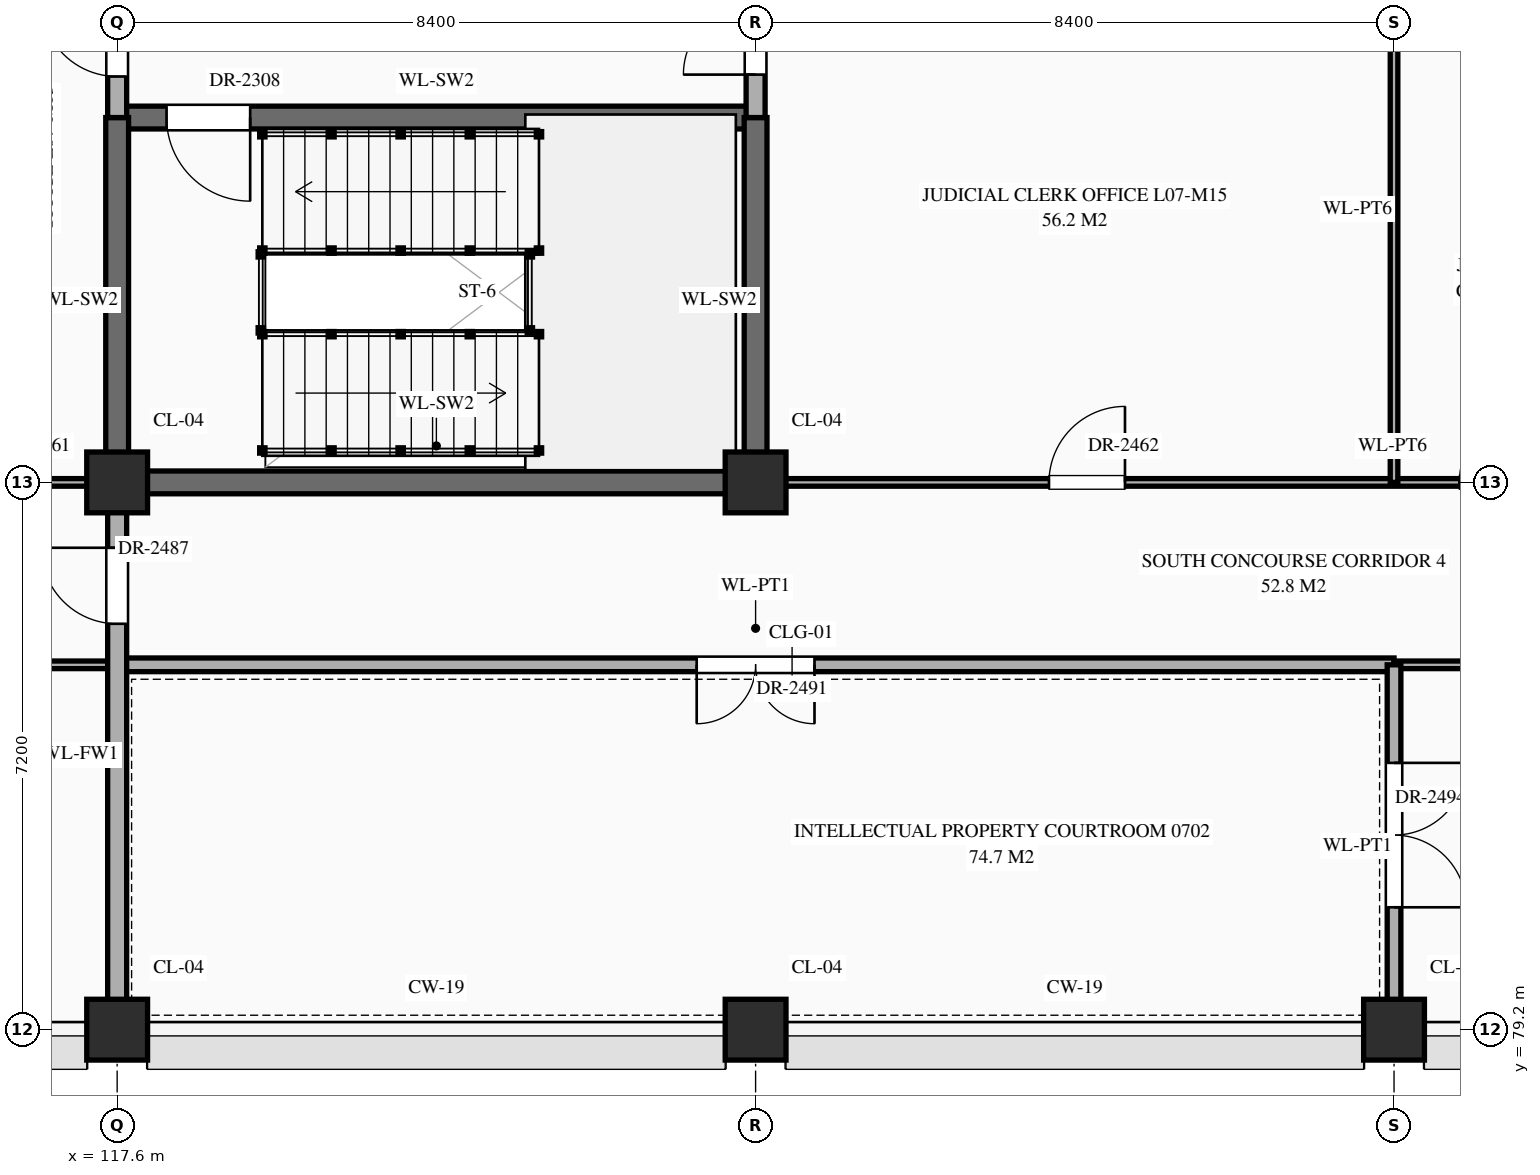
"""IFC4 building model, lengths in metres.
Left out: names, types, materials, properties, quantities, classifications, styles, units other than length and angle.
Written with IfcOpenShell. Run it as: python <this file> out.ifc"""

import sys

from ifc_helpers import new_model, si_unit, direction, frame, frame_2d, origin, origin_2d, place, context, subcontext, project, spatial, rectangle, extrude, element, fill, save


model = new_model("IFC4")
c1 = context("Model", 3, precision=1e-05, world=origin(), true_north=direction((0.0, 1.0)))
c2 = subcontext(c1, "Body", "Model", "MODEL_VIEW")
j1 = project(units=[si_unit("LENGTHUNIT", "METRE"), si_unit("PLANEANGLEUNIT", "RADIAN")], contexts=[c1])
p1 = place(None, origin())
s1 = spatial("IfcSite", under=j1, at=p1, CompositionType="ELEMENT")
p2 = place(p1, origin())
s2 = spatial("IfcBuilding", under=s1, at=p2, CompositionType="ELEMENT")
p3 = place(p2, frame((0.0, 0.0, 30.6)))
s3 = spatial("IfcBuildingStorey", under=s2, at=p3, CompositionType="ELEMENT", Elevation=30.6)
for number, where, z_axis, x_axis in (
    (1, (117.6, 79.2, 0.0), (0.0, 0.0, 1.0), (1.0, 0.0, 0.0)),
    (2, (117.6, 86.4, 0.0), (0.0, 0.0, 1.0), (1.0, 0.0, 0.0)),
    (3, (126.0, 79.2, 0.0), (0.0, 0.0, 1.0), (1.0, 0.0, 0.0)),
    (4, (126.0, 86.4, 0.0), (0.0, 0.0, 1.0), (1.0, 0.0, 0.0)),
    (5, (134.4, 79.2, 0.0), (0.0, 0.0, 1.0), (1.0, 0.0, 0.0)),
):
    element("IfcColumn", number, at=place(p3, frame(where, z_axis=z_axis, x_axis=x_axis)), inside=s3, PredefinedType="COLUMN", context=c2, shape_type="SweptSolid", body=[
        extrude(rectangle(XDim=0.8, YDim=0.8, at=origin_2d()), origin(), (0.0, 0.0, 1.0), 4.5),
    ])
p4 = place(p3, frame((100.8, 84.0, 0.0), z_axis=(0.0, 0.0, 1.0), x_axis=(1.0, 0.0, 0.0)))
e6 = element("IfcWall", 6, at=p4, inside=s3, PredefinedType="STANDARD", context=c2, shape_type="SweptSolid", body=[
    extrude(rectangle(XDim=16.8, YDim=0.1, at=frame_2d((8.4, 0.0))), origin(), (0.0, 0.0, 1.0), 4.24),
])
p5 = place(p4, frame((3.69, 0.0, 0.0)))
e7 = element("IfcOpeningElement", 7, at=p5, cuts=e6, PredefinedType="OPENING", context=c2, shape_type="SweptSolid", body=[
    extrude(rectangle(XDim=1.02, YDim=2.4, at=frame_2d((0.51, 1.2))), frame((0.0, 0.062, 0.0), z_axis=(0.0, -1.0, 0.0), x_axis=(1.0, 0.0, 0.0)), (0.0, 0.0, 1.0), 0.124),
])
p6 = place(p4, frame((12.07, 0.0, 0.0)))
e8 = element("IfcOpeningElement", 8, at=p6, cuts=e6, PredefinedType="OPENING", context=c2, shape_type="SweptSolid", body=[
    extrude(rectangle(XDim=1.06, YDim=2.4, at=frame_2d((0.53, 1.2))), frame((0.0, 0.062, 0.0), z_axis=(0.0, -1.0, 0.0), x_axis=(1.0, 0.0, 0.0)), (0.0, 0.0, 1.0), 0.124),
])
p7 = place(p3, frame((117.6, 84.0, 0.0), z_axis=(0.0, 0.0, 1.0), x_axis=(1.0, 0.0, 0.0)))
e9 = element("IfcWall", 9, at=p7, inside=s3, PredefinedType="STANDARD", context=c2, shape_type="SweptSolid", body=[
    extrude(rectangle(XDim=16.8, YDim=0.18, at=frame_2d((8.4, 0.0))), origin(), (0.0, 0.0, 1.0), 4.24),
])
p8 = place(p7, frame((7.625, 0.0, 0.0)))
e10 = element("IfcOpeningElement", 10, at=p8, cuts=e9, PredefinedType="OPENING", context=c2, shape_type="SweptSolid", body=[
    extrude(rectangle(XDim=1.55, YDim=2.35, at=frame_2d((0.775, 1.175))), frame((0.0, 0.102, 0.0), z_axis=(0.0, -1.0, 0.0), x_axis=(1.0, 0.0, 0.0)), (0.0, 0.0, 1.0), 0.204),
])
p9 = place(p3, frame((134.4, 84.0, 0.0), z_axis=(0.0, 0.0, 1.0), x_axis=(1.0, 0.0, 0.0)))
e11 = element("IfcWall", 11, at=p9, inside=s3, PredefinedType="STANDARD", context=c2, shape_type="SweptSolid", body=[
    extrude(rectangle(XDim=8.36, YDim=0.1, at=frame_2d((4.18, 0.0))), origin(), (0.0, 0.0, 1.0), 4.3),
])
p10 = place(p9, frame((3.33, 0.0, 0.0)))
e12 = element("IfcOpeningElement", 12, at=p10, cuts=e11, PredefinedType="OPENING", context=c2, shape_type="SweptSolid", body=[
    extrude(rectangle(XDim=1.7, YDim=2.45, at=frame_2d((0.85, 1.225))), frame((0.0, 0.062, 0.0), z_axis=(0.0, -1.0, 0.0), x_axis=(1.0, 0.0, 0.0)), (0.0, 0.0, 1.0), 0.124),
])
p11 = place(p3, frame((109.2, 86.4, 0.0), z_axis=(0.0, 0.0, 1.0), x_axis=(1.0, 0.0, 0.0)))
e13 = element("IfcWall", 13, at=p11, inside=s3, PredefinedType="STANDARD", context=c2, shape_type="SweptSolid", body=[
    extrude(rectangle(XDim=8.4, YDim=0.1, at=frame_2d((4.2, 0.0))), origin(), (0.0, 0.0, 1.0), 3.39),
])
p12 = place(p11, frame((1.11, 0.0, 0.0)))
e14 = element("IfcOpeningElement", 14, at=p12, cuts=e13, PredefinedType="OPENING", context=c2, shape_type="SweptSolid", body=[
    extrude(rectangle(XDim=0.9, YDim=2.15, at=frame_2d((0.45, 1.075))), frame((0.0, 0.062, 0.0), z_axis=(0.0, -1.0, 0.0), x_axis=(1.0, 0.0, 0.0)), (0.0, 0.0, 1.0), 0.124),
])
p13 = place(p11, frame((3.74, 0.0, 0.0)))
e15 = element("IfcOpeningElement", 15, at=p13, cuts=e13, PredefinedType="OPENING", context=c2, shape_type="SweptSolid", body=[
    extrude(rectangle(XDim=0.92, YDim=2.15, at=frame_2d((0.46, 1.075))), frame((0.0, 0.062, 0.0), z_axis=(0.0, -1.0, 0.0), x_axis=(1.0, 0.0, 0.0)), (0.0, 0.0, 1.0), 0.124),
])
p14 = place(p11, frame((6.36, 0.0, 0.0)))
e16 = element("IfcOpeningElement", 16, at=p14, cuts=e13, PredefinedType="OPENING", context=c2, shape_type="SweptSolid", body=[
    extrude(rectangle(XDim=0.96, YDim=2.2, at=frame_2d((0.48, 1.1))), frame((0.0, 0.062, 0.0), z_axis=(0.0, -1.0, 0.0), x_axis=(1.0, 0.0, 0.0)), (0.0, 0.0, 1.0), 0.124),
])
p15 = place(p3, frame((117.6, 86.4, 0.0), z_axis=(0.0, 0.0, 1.0), x_axis=(1.0, 0.0, 0.0)))
e17 = element("IfcWall", 17, at=p15, inside=s3, PredefinedType="SHEAR", context=c2, shape_type="SweptSolid", body=[
    extrude(rectangle(XDim=8.4, YDim=0.3, at=frame_2d((4.2, 0.0))), origin(), (0.0, 0.0, 1.0), 4.24),
])
p16 = place(p3, frame((126.0, 86.4, 0.0), z_axis=(0.0, 0.0, 1.0), x_axis=(1.0, 0.0, 0.0)))
e18 = element("IfcWall", 18, at=p16, inside=s3, PredefinedType="STANDARD", context=c2, shape_type="SweptSolid", body=[
    extrude(rectangle(XDim=16.76, YDim=0.1, at=frame_2d((8.38, 0.0))), origin(), (0.0, 0.0, 1.0), 3.1),
])
p17 = place(p16, frame((3.86, 0.0, 0.0)))
e19 = element("IfcOpeningElement", 19, at=p17, cuts=e18, PredefinedType="OPENING", context=c2, shape_type="SweptSolid", body=[
    extrude(rectangle(XDim=1.0, YDim=2.25, at=frame_2d((0.5, 1.125))), frame((0.0, 0.062, 0.0), z_axis=(0.0, -1.0, 0.0), x_axis=(1.0, 0.0, 0.0)), (0.0, 0.0, 1.0), 0.124),
])
p18 = place(p16, frame((9.26, 0.0, 0.0)))
e20 = element("IfcOpeningElement", 20, at=p18, cuts=e18, PredefinedType="OPENING", context=c2, shape_type="SweptSolid", body=[
    extrude(rectangle(XDim=1.08, YDim=2.25, at=frame_2d((0.54, 1.125))), frame((0.0, 0.062, 0.0), z_axis=(0.0, -1.0, 0.0), x_axis=(1.0, 0.0, 0.0)), (0.0, 0.0, 1.0), 0.124),
])
p19 = place(p16, frame((11.775, 0.0, 0.0)))
e21 = element("IfcOpeningElement", 21, at=p19, cuts=e18, PredefinedType="OPENING", context=c2, shape_type="SweptSolid", body=[
    extrude(rectangle(XDim=1.65, YDim=2.4, at=frame_2d((0.825, 1.2))), frame((0.0, 0.062, 0.0), z_axis=(0.0, -1.0, 0.0), x_axis=(1.0, 0.0, 0.0)), (0.0, 0.0, 1.0), 0.124),
])
p20 = place(p16, frame((14.64, 0.0, 0.0)))
e22 = element("IfcOpeningElement", 22, at=p20, cuts=e18, PredefinedType="OPENING", context=c2, shape_type="SweptSolid", body=[
    extrude(rectangle(XDim=1.2, YDim=2.35, at=frame_2d((0.6, 1.175))), frame((0.0, 0.062, 0.0), z_axis=(0.0, -1.0, 0.0), x_axis=(1.0, 0.0, 0.0)), (0.0, 0.0, 1.0), 0.124),
])
p21 = place(p3, frame((117.6, 91.2, 0.0), z_axis=(0.0, 0.0, 1.0), x_axis=(1.0, 0.0, 0.0)))
e23 = element("IfcWall", 23, at=p21, inside=s3, PredefinedType="SHEAR", context=c2, shape_type="SweptSolid", body=[
    extrude(rectangle(XDim=8.4, YDim=0.3, at=frame_2d((4.2, 0.0))), origin(), (0.0, 0.0, 1.0), 4.24),
])
p22 = place(p21, frame((0.65, 0.0, 0.0)))
e24 = element("IfcOpeningElement", 24, at=p22, cuts=e23, PredefinedType="OPENING", context=c2, shape_type="SweptSolid", body=[
    extrude(rectangle(XDim=1.1, YDim=2.2, at=frame_2d((0.55, 1.1))), frame((0.0, 0.162, 0.0), z_axis=(0.0, -1.0, 0.0), x_axis=(1.0, 0.0, 0.0)), (0.0, 0.0, 1.0), 0.324),
])
p23 = place(p3, frame((117.6, 79.24, 0.0), z_axis=(0.0, 0.0, 1.0), x_axis=(0.0, 1.0, 0.0)))
e25 = element("IfcWall", 25, at=p23, inside=s3, PredefinedType="STANDARD", context=c2, shape_type="SweptSolid", body=[
    extrude(rectangle(XDim=7.16, YDim=0.25, at=frame_2d((3.58, 0.0))), origin(), (0.0, 0.0, 1.0), 3.49),
])
p24 = place(p23, frame((5.3, 0.0, 0.0)))
e26 = element("IfcOpeningElement", 26, at=p24, cuts=e25, PredefinedType="OPENING", context=c2, shape_type="SweptSolid", body=[
    extrude(rectangle(XDim=1.0, YDim=2.2, at=frame_2d((0.5, 1.1))), frame((0.0, 0.137, 0.0), z_axis=(0.0, -1.0, 0.0), x_axis=(1.0, 0.0, 0.0)), (0.0, 0.0, 1.0), 0.274),
])
p25 = place(p3, frame((117.6, 86.4, 0.0), z_axis=(0.0, 0.0, 1.0), x_axis=(0.0, 1.0, 0.0)))
e27 = element("IfcWall", 27, at=p25, inside=s3, PredefinedType="SHEAR", context=c2, shape_type="SweptSolid", body=[
    extrude(rectangle(XDim=4.8, YDim=0.3, at=frame_2d((2.4, 0.0))), origin(), (0.0, 0.0, 1.0), 4.24),
])
p26 = place(p3, frame((117.6, 91.2, 0.0), z_axis=(0.0, 0.0, 1.0), x_axis=(0.0, 1.0, 0.0)))
e28 = element("IfcWall", 28, at=p26, inside=s3, PredefinedType="STANDARD", context=c2, shape_type="SweptSolid", body=[
    extrude(rectangle(XDim=13.2, YDim=0.25, at=frame_2d((6.6, 0.0))), origin(), (0.0, 0.0, 1.0), 3.49),
])
p27 = place(p26, frame((0.54, 0.0, 0.0)))
e29 = element("IfcOpeningElement", 29, at=p27, cuts=e28, PredefinedType="OPENING", context=c2, shape_type="SweptSolid", body=[
    extrude(rectangle(XDim=1.0, YDim=2.2, at=frame_2d((0.5, 1.1))), frame((0.0, 0.137, 0.0), z_axis=(0.0, -1.0, 0.0), x_axis=(1.0, 0.0, 0.0)), (0.0, 0.0, 1.0), 0.274),
])
p28 = place(p26, frame((10.485, 0.0, 0.0)))
e30 = element("IfcOpeningElement", 30, at=p28, cuts=e28, PredefinedType="OPENING", context=c2, shape_type="SweptSolid", body=[
    extrude(rectangle(XDim=0.95, YDim=2.15, at=frame_2d((0.475, 1.075))), frame((0.0, 0.137, 0.0), z_axis=(0.0, -1.0, 0.0), x_axis=(1.0, 0.0, 0.0)), (0.0, 0.0, 1.0), 0.274),
])
p29 = place(p26, frame((3.285, 0.0, 0.0)))
e31 = element("IfcOpeningElement", 31, at=p29, cuts=e28, PredefinedType="OPENING", context=c2, shape_type="SweptSolid", body=[
    extrude(rectangle(XDim=0.95, YDim=2.15, at=frame_2d((0.475, 1.075))), frame((0.0, 0.137, 0.0), z_axis=(0.0, -1.0, 0.0), x_axis=(1.0, 0.0, 0.0)), (0.0, 0.0, 1.0), 0.274),
])
p30 = place(p3, frame((126.0, 86.4, 0.0), z_axis=(0.0, 0.0, 1.0), x_axis=(0.0, 1.0, 0.0)))
e32 = element("IfcWall", 32, at=p30, inside=s3, PredefinedType="SHEAR", context=c2, shape_type="SweptSolid", body=[
    extrude(rectangle(XDim=4.8, YDim=0.3, at=frame_2d((2.4, 0.0))), origin(), (0.0, 0.0, 1.0), 4.24),
])
p31 = place(p3, frame((126.0, 91.2, 0.0), z_axis=(0.0, 0.0, 1.0), x_axis=(0.0, 1.0, 0.0)))
e33 = element("IfcWall", 33, at=p31, inside=s3, PredefinedType="STANDARD", context=c2, shape_type="SweptSolid", body=[
    extrude(rectangle(XDim=2.4, YDim=0.25, at=frame_2d((1.2, 0.0))), origin(), (0.0, 0.0, 1.0), 3.4),
])
p32 = place(p31, frame((0.565, 0.0, 0.0)))
e34 = element("IfcOpeningElement", 34, at=p32, cuts=e33, PredefinedType="OPENING", context=c2, shape_type="SweptSolid", body=[
    extrude(rectangle(XDim=0.95, YDim=2.15, at=frame_2d((0.475, 1.075))), frame((0.0, 0.137, 0.0), z_axis=(0.0, -1.0, 0.0), x_axis=(1.0, 0.0, 0.0)), (0.0, 0.0, 1.0), 0.274),
])
p33 = place(p3, frame((134.4, 79.24, 0.0), z_axis=(0.0, 0.0, 1.0), x_axis=(0.0, 1.0, 0.0)))
e35 = element("IfcWall", 35, at=p33, inside=s3, PredefinedType="STANDARD", context=c2, shape_type="SweptSolid", body=[
    extrude(rectangle(XDim=4.76, YDim=0.18, at=frame_2d((2.38, 0.0))), origin(), (0.0, 0.0, 1.0), 4.15),
])
p34 = place(p33, frame((1.57, 0.0, 0.0)))
e36 = element("IfcOpeningElement", 36, at=p34, cuts=e35, PredefinedType="OPENING", context=c2, shape_type="SweptSolid", body=[
    extrude(rectangle(XDim=1.9, YDim=2.5, at=frame_2d((0.95, 1.25))), frame((0.0, 0.102, 0.0), z_axis=(0.0, -1.0, 0.0), x_axis=(1.0, 0.0, 0.0)), (0.0, 0.0, 1.0), 0.204),
])
p35 = place(p3, frame((134.4, 86.4, 0.0), z_axis=(0.0, 0.0, 1.0), x_axis=(0.0, 1.0, 0.0)))
e37 = element("IfcWall", 37, at=p35, inside=s3, PredefinedType="STANDARD", context=c2, shape_type="SweptSolid", body=[
    extrude(rectangle(XDim=7.2, YDim=0.1, at=frame_2d((3.6, 0.0))), origin(), (0.0, 0.0, 1.0), 4.15),
])
p36 = place(p22, frame((1.1, 0.0, 0.0), z_axis=(0.0, 0.0, 1.0), x_axis=(-1.0, 0.0, 0.0)))
e38 = element("IfcDoor", 38, at=p36, inside=s3, OperationType="SINGLE_SWING_LEFT", PredefinedType="DOOR", context=c2, shape_type="SweptSolid", body=[
    extrude(rectangle(XDim=1.1, YDim=2.2, at=frame_2d((0.55, 1.1))), frame((0.0, 0.025, 0.0), z_axis=(0.0, -1.0, 0.0), x_axis=(1.0, 0.0, 0.0)), (0.0, 0.0, 1.0), 0.05),
])
fill(e24, e38)
p37 = place(p27, origin())
e39 = element("IfcDoor", 39, at=p37, inside=s3, OperationType="SINGLE_SWING_RIGHT", PredefinedType="DOOR", context=c2, shape_type="SweptSolid", body=[
    extrude(rectangle(XDim=1.0, YDim=2.2, at=frame_2d((0.5, 1.1))), frame((0.0, 0.025, 0.0), z_axis=(0.0, -1.0, 0.0), x_axis=(1.0, 0.0, 0.0)), (0.0, 0.0, 1.0), 0.05),
])
fill(e29, e39)
p38 = place(p32, origin())
e40 = element("IfcDoor", 40, at=p38, inside=s3, OperationType="SINGLE_SWING_LEFT", PredefinedType="DOOR", context=c2, shape_type="SweptSolid", body=[
    extrude(rectangle(XDim=0.95, YDim=2.15, at=frame_2d((0.475, 1.075))), frame((0.0, 0.025, 0.0), z_axis=(0.0, -1.0, 0.0), x_axis=(1.0, 0.0, 0.0)), (0.0, 0.0, 1.0), 0.05),
])
fill(e34, e40)
p39 = place(p17, origin())
e41 = element("IfcDoor", 41, at=p39, inside=s3, OperationType="SINGLE_SWING_RIGHT", PredefinedType="DOOR", context=c2, shape_type="SweptSolid", body=[
    extrude(rectangle(XDim=1.0, YDim=2.25, at=frame_2d((0.5, 1.125))), frame((0.0, 0.025, 0.0), z_axis=(0.0, -1.0, 0.0), x_axis=(1.0, 0.0, 0.0)), (0.0, 0.0, 1.0), 0.05),
])
fill(e19, e41)
p40 = place(p24, origin())
e42 = element("IfcDoor", 42, at=p40, inside=s3, OperationType="SINGLE_SWING_RIGHT", PredefinedType="DOOR", context=c2, shape_type="SweptSolid", body=[
    extrude(rectangle(XDim=1.0, YDim=2.2, at=frame_2d((0.5, 1.1))), frame((0.0, 0.025, 0.0), z_axis=(0.0, -1.0, 0.0), x_axis=(1.0, 0.0, 0.0)), (0.0, 0.0, 1.0), 0.05),
])
fill(e26, e42)
p41 = place(p8, frame((1.55, 0.0, 0.0), z_axis=(0.0, 0.0, 1.0), x_axis=(-1.0, 0.0, 0.0)))
e43 = element("IfcDoor", 43, at=p41, inside=s3, OperationType="DOUBLE_DOOR_SINGLE_SWING", PredefinedType="DOOR", context=c2, shape_type="SweptSolid", body=[
    extrude(rectangle(XDim=1.55, YDim=2.35, at=frame_2d((0.775, 1.175))), frame((0.0, 0.025, 0.0), z_axis=(0.0, -1.0, 0.0), x_axis=(1.0, 0.0, 0.0)), (0.0, 0.0, 1.0), 0.05),
])
fill(e10, e43)
p42 = place(p34, frame((1.9, 0.0, 0.0), z_axis=(0.0, 0.0, 1.0), x_axis=(-1.0, 0.0, 0.0)))
e44 = element("IfcDoor", 44, at=p42, inside=s3, OperationType="DOUBLE_DOOR_SINGLE_SWING", PredefinedType="DOOR", context=c2, shape_type="SweptSolid", body=[
    extrude(rectangle(XDim=1.9, YDim=2.5, at=frame_2d((0.95, 1.25))), frame((0.0, 0.025, 0.0), z_axis=(0.0, -1.0, 0.0), x_axis=(1.0, 0.0, 0.0)), (0.0, 0.0, 1.0), 0.05),
])
fill(e36, e44)
save(model, sys.argv[1])
